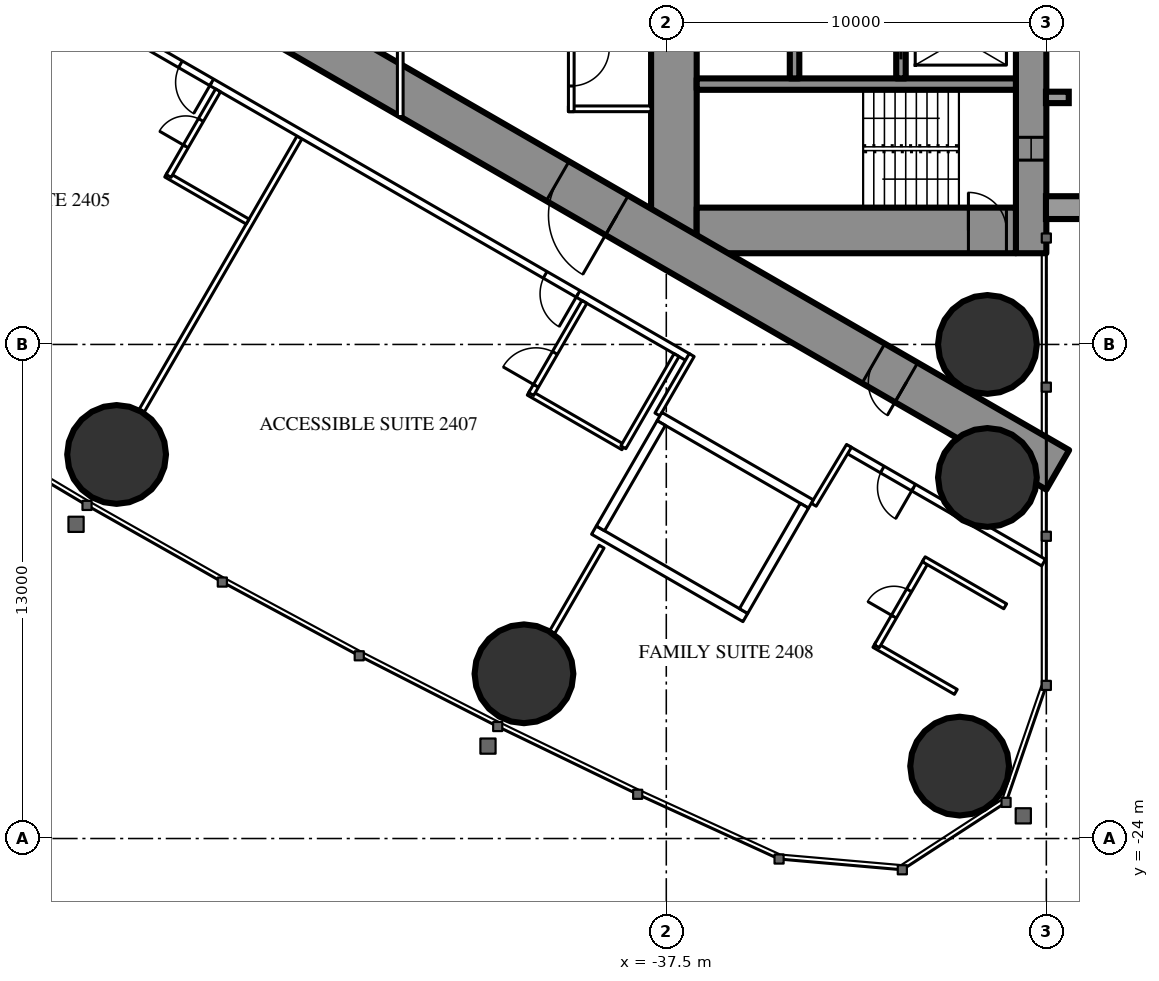
"""IFC4 building model, lengths in metres.
Left out: names, types, materials, properties, quantities, classifications, styles, units other than length and angle.
Written with IfcOpenShell. Run it as: python <this file> out.ifc"""

import sys

from ifc_helpers import new_model, si_unit, direction, frame, frame_2d, origin, origin_2d, place, context, subcontext, project, spatial, rectangle, hollow_circle, extrude, element, fill, save


model = new_model("IFC4")
c1 = context("Model", 3, precision=1e-05, world=origin(), true_north=direction((0.0, 1.0)))
c2 = subcontext(c1, "Body", "Model", "MODEL_VIEW")
j1 = project(units=[si_unit("LENGTHUNIT", "METRE"), si_unit("PLANEANGLEUNIT", "RADIAN")], contexts=[c1])
p1 = place(None, origin())
s1 = spatial("IfcSite", under=j1, at=p1, CompositionType="ELEMENT")
p2 = place(p1, origin())
s2 = spatial("IfcBuilding", under=s1, at=p2, CompositionType="ELEMENT")
p3 = place(p2, frame((0.0, 0.0, 94.1)))
s3 = spatial("IfcBuildingStorey", under=s2, at=p3, CompositionType="ELEMENT", Elevation=94.1)
for number, where, z_axis, x_axis in (
    (1, (-29.781, -22.095, 0.0), (0.0, 0.0, 1.0), (1.0, 0.0, 0.0)),
    (2, (-29.05, -11.0, 0.0), (0.0, 0.0, 1.0), (1.0, 0.0, 0.0)),
    (3, (-29.05, -14.5, 0.0), (0.0, 0.0, 1.0), (1.0, 0.0, 0.0)),
    (4, (-51.963, -13.895, 0.0), (0.0, 0.0, 1.0), (1.0, 0.0, 0.0)),
    (5, (-41.245, -19.666, 0.0), (0.0, 0.0, 1.0), (1.0, 0.0, 0.0)),
):
    element("IfcColumn", number, at=place(p3, frame(where, z_axis=z_axis, x_axis=x_axis)), inside=s3, PredefinedType="COLUMN", context=c2, shape_type="SweptSolid", body=[
        extrude(hollow_circle(Radius=1.3, WallThickness=0.1, at=origin_2d()), origin(), (0.0, 0.0, 1.0), 3.5),
    ])
p4 = place(p3, frame((-27.9, 8.6, 0.0), z_axis=(0.0, 0.0, 1.0), x_axis=(0.0, -1.0, 0.0)))
e6 = element("IfcWall", 6, at=p4, inside=s3, PredefinedType="SHEAR", context=c2, shape_type="SweptSolid", body=[
    extrude(rectangle(XDim=17.2, YDim=0.8, at=frame_2d((8.6, 0.0))), origin(), (0.0, 0.0, 1.0), 3.5),
])
p5 = place(p4, frame((2.45, 0.0, 0.6)))
e7 = element("IfcOpeningElement", 7, at=p5, cuts=e6, PredefinedType="OPENING", context=c2, shape_type="SweptSolid", body=[
    extrude(rectangle(XDim=0.6, YDim=2.1, at=frame_2d((0.3, 1.05))), frame((0.0, 0.41, 0.0), z_axis=(0.0, -1.0, 0.0), x_axis=(1.0, 0.0, 0.0)), (0.0, 0.0, 1.0), 0.82),
])
p6 = place(p4, frame((14.15, 0.0, 0.6)))
e8 = element("IfcOpeningElement", 8, at=p6, cuts=e6, PredefinedType="OPENING", context=c2, shape_type="SweptSolid", body=[
    extrude(rectangle(XDim=0.6, YDim=2.1, at=frame_2d((0.3, 1.05))), frame((0.0, 0.41, 0.0), z_axis=(0.0, -1.0, 0.0), x_axis=(1.0, 0.0, 0.0)), (0.0, 0.0, 1.0), 0.82),
])
p7 = place(p3, frame((-37.3, 8.6, 0.0), z_axis=(0.0, 0.0, 1.0), x_axis=(0.0, -1.0, 0.0)))
e9 = element("IfcWall", 9, at=p7, inside=s3, PredefinedType="SHEAR", context=c2, shape_type="SweptSolid", body=[
    extrude(rectangle(XDim=17.2, YDim=1.2, at=frame_2d((8.6, 0.0))), origin(), (0.0, 0.0, 1.0), 3.5),
])
p8 = place(p7, frame((7.7, 0.0, 0.0)))
e10 = element("IfcOpeningElement", 10, at=p8, cuts=e9, PredefinedType="OPENING", context=c2, shape_type="SweptSolid", body=[
    extrude(rectangle(XDim=1.8, YDim=2.2, at=frame_2d((0.9, 1.1))), frame((0.0, 0.61, 0.0), z_axis=(0.0, -1.0, 0.0), x_axis=(1.0, 0.0, 0.0)), (0.0, 0.0, 1.0), 1.22),
])
p9 = place(p3, frame((-28.3, -8.0, 0.0), z_axis=(0.0, 0.0, 1.0), x_axis=(-1.0, 0.0, 0.0)))
e11 = element("IfcWall", 11, at=p9, inside=s3, PredefinedType="SHEAR", context=c2, shape_type="SweptSolid", body=[
    extrude(rectangle(XDim=8.4, YDim=1.2, at=frame_2d((4.2, 0.0))), origin(), (0.0, 0.0, 1.0), 3.5),
])
p10 = place(p9, frame((0.25, 0.0, 0.0)))
e12 = element("IfcOpeningElement", 12, at=p10, cuts=e11, PredefinedType="OPENING", context=c2, shape_type="SweptSolid", body=[
    extrude(rectangle(XDim=1.0, YDim=2.2, at=frame_2d((0.5, 1.1))), frame((0.0, 0.61, 0.0), z_axis=(0.0, -1.0, 0.0), x_axis=(1.0, 0.0, 0.0)), (0.0, 0.0, 1.0), 1.22),
])
p11 = place(p3, frame((-28.3, -4.15, 0.0), z_axis=(0.0, 0.0, 1.0), x_axis=(-1.0, 0.0, 0.0)))
e13 = element("IfcWall", 13, at=p11, inside=s3, PredefinedType="SHEAR", context=c2, shape_type="SweptSolid", body=[
    extrude(rectangle(XDim=8.4, YDim=0.3, at=frame_2d((4.2, 0.0))), origin(), (0.0, 0.0, 1.0), 3.5),
])
p12 = place(p3, frame((-31.325, -1.9, 0.0), z_axis=(0.0, 0.0, 1.0), x_axis=(0.0, -1.0, 0.0)))
e14 = element("IfcWall", 14, at=p12, inside=s3, PredefinedType="SHEAR", context=c2, shape_type="SweptSolid", body=[
    extrude(rectangle(XDim=2.1, YDim=0.25, at=frame_2d((1.05, 0.0))), origin(), (0.0, 0.0, 1.0), 3.5),
])
p13 = place(p12, frame((0.5, 0.0, 0.0)))
e15 = element("IfcOpeningElement", 15, at=p13, cuts=e14, PredefinedType="OPENING", context=c2, shape_type="SweptSolid", body=[
    extrude(rectangle(XDim=1.1, YDim=2.2, at=frame_2d((0.55, 1.1))), frame((0.0, 0.135, 0.0), z_axis=(0.0, -1.0, 0.0), x_axis=(1.0, 0.0, 0.0)), (0.0, 0.0, 1.0), 0.27),
])
p14 = place(p3, frame((-34.125, -1.65, 0.0), z_axis=(0.0, 0.0, 1.0), x_axis=(0.0, -1.0, 0.0)))
e16 = element("IfcWall", 16, at=p14, inside=s3, PredefinedType="SHEAR", context=c2, shape_type="SweptSolid", body=[
    extrude(rectangle(XDim=2.35, YDim=0.25, at=frame_2d((1.175, 0.0))), origin(), (0.0, 0.0, 1.0), 3.5),
])
p15 = place(p3, frame((-27.2, -14.3, 0.0), z_axis=(0.0, 0.0, 1.0), x_axis=(-0.866024021859, 0.500002393557, 0.0)))
e17 = element("IfcWall", 17, at=p15, inside=s3, PredefinedType="SHEAR", context=c2, shape_type="SweptSolid", body=[
    extrude(rectangle(XDim=27.907, YDim=1.2, at=frame_2d((13.954, 0.0))), origin(), (0.0, 0.0, 1.0), 3.5),
])
p16 = place(p15, frame((4.6, 0.0, 0.0)))
e18 = element("IfcOpeningElement", 18, at=p16, cuts=e17, PredefinedType="OPENING", context=c2, shape_type="SweptSolid", body=[
    extrude(rectangle(XDim=1.0, YDim=2.2, at=frame_2d((0.5, 1.1))), frame((0.0, 0.61, 0.0), z_axis=(0.0, -1.0, 0.0), x_axis=(1.0, 0.0, 0.0)), (0.0, 0.0, 1.0), 1.22),
])
p17 = place(p15, frame((13.395, 0.0, 0.0)))
e19 = element("IfcOpeningElement", 19, at=p17, cuts=e17, PredefinedType="OPENING", context=c2, shape_type="SweptSolid", body=[
    extrude(rectangle(XDim=1.8, YDim=2.2, at=frame_2d((0.9, 1.1))), frame((0.0, 0.61, 0.0), z_axis=(0.0, -1.0, 0.0), x_axis=(1.0, 0.0, 0.0)), (0.0, 0.0, 1.0), 1.22),
])
p18 = place(p3, frame((-47.151, -5.552, 0.0), z_axis=(0.0, 0.0, 1.0), x_axis=(-0.500003012045, -0.866023664773, 0.0)))
e20 = element("IfcWall", 20, at=p18, inside=s3, PredefinedType="PARTITIONING", context=c2, shape_type="SweptSolid", body=[
    extrude(rectangle(XDim=8.311, YDim=0.15, at=frame_2d((4.156, 0.0))), origin(), (0.0, 0.0, 1.0), 2.2),
])
p19 = place(p3, frame((-39.202, -16.32, 0.0), z_axis=(0.0, 0.0, 1.0), x_axis=(-0.49997716683, -0.86603858612, 0.0)))
e21 = element("IfcWall", 21, at=p19, inside=s3, PredefinedType="PARTITIONING", context=c2, shape_type="SweptSolid", body=[
    extrude(rectangle(XDim=2.6, YDim=0.15, at=frame_2d((1.3, 0.0))), origin(), (0.0, 0.0, 1.0), 3.25),
])
p20 = place(p3, frame((-27.572, -16.741, 0.0), z_axis=(0.0, 0.0, 1.0), x_axis=(-0.866024464444, 0.500001626982, 0.0)))
e22 = element("IfcWall", 22, at=p20, inside=s3, PredefinedType="PARTITIONING", context=c2, shape_type="SweptSolid", body=[
    extrude(rectangle(XDim=5.955, YDim=0.2, at=frame_2d((2.978, 0.0))), origin(), (0.0, 0.0, 1.0), 3.25),
])
p21 = place(p20, frame((3.95, 0.0, 0.0)))
e23 = element("IfcOpeningElement", 23, at=p21, cuts=e22, PredefinedType="OPENING", context=c2, shape_type="SweptSolid", body=[
    extrude(rectangle(XDim=0.95, YDim=2.2, at=frame_2d((0.475, 1.1))), frame((0.0, 0.11, 0.0), z_axis=(0.0, -1.0, 0.0), x_axis=(1.0, 0.0, 0.0)), (0.0, 0.0, 1.0), 0.22),
])
p22 = place(p3, frame((-36.92, -11.344, 0.0), z_axis=(0.0, 0.0, 1.0), x_axis=(-0.866028313256, 0.499994960614, 0.0)))
e24 = element("IfcWall", 24, at=p22, inside=s3, PredefinedType="PARTITIONING", context=c2, shape_type="SweptSolid", body=[
    extrude(rectangle(XDim=22.568, YDim=0.2, at=frame_2d((11.284, 0.0))), origin(), (0.0, 0.0, 1.0), 3.25),
])
p23 = place(p22, frame((14.481, 0.0, 0.0)))
e25 = element("IfcOpeningElement", 25, at=p23, cuts=e24, PredefinedType="OPENING", context=c2, shape_type="SweptSolid", body=[
    extrude(rectangle(XDim=0.95, YDim=2.2, at=frame_2d((0.475, 1.1))), frame((0.0, 0.11, 0.0), z_axis=(0.0, -1.0, 0.0), x_axis=(1.0, 0.0, 0.0)), (0.0, 0.0, 1.0), 0.22),
])
p24 = place(p22, frame((3.35, 0.0, 0.0)))
e26 = element("IfcOpeningElement", 26, at=p24, cuts=e24, PredefinedType="OPENING", context=c2, shape_type="SweptSolid", body=[
    extrude(rectangle(XDim=1.0, YDim=2.2, at=frame_2d((0.5, 1.1))), frame((0.0, 0.11, 0.0), z_axis=(0.0, -1.0, 0.0), x_axis=(1.0, 0.0, 0.0)), (0.0, 0.0, 1.0), 0.22),
])
p25 = place(p3, frame((-36.831, -11.28, 0.0), z_axis=(0.0, 0.0, 1.0), x_axis=(-0.499937177781, -0.866061671171, 0.0)))
e27 = element("IfcWall", 27, at=p25, inside=s3, PredefinedType="PARTITIONING", context=c2, shape_type="SweptSolid", body=[
    extrude(rectangle(XDim=1.804, YDim=0.15, at=frame_2d((0.902, 0.0))), origin(), (0.0, 0.0, 1.0), 3.25),
])
p26 = place(p3, frame((-33.621, -15.218, 0.0), z_axis=(0.0, 0.0, 1.0), x_axis=(0.514336634837, 0.857588377991, 0.0)))
e28 = element("IfcWall", 28, at=p26, inside=s3, PredefinedType="PARTITIONING", context=c2, shape_type="SweptSolid", body=[
    extrude(rectangle(XDim=1.805, YDim=0.15, at=frame_2d((0.903, 0.0))), origin(), (0.0, 0.0, 1.0), 3.25),
])
p27 = place(p3, frame((-48.516, -7.767, 0.0), z_axis=(0.0, 0.0, 1.0), x_axis=(-0.866031185235, 0.4999899861, 0.0)))
e29 = element("IfcWall", 29, at=p27, inside=s3, PredefinedType="PARTITIONING", context=c2, shape_type="SweptSolid", body=[
    extrude(rectangle(XDim=2.475, YDim=0.15, at=frame_2d((1.238, 0.0))), origin(), (0.0, 0.0, 1.0), 3.25),
])
p28 = place(p3, frame((-49.295, -4.315, 0.0), z_axis=(0.0, 0.0, 1.0), x_axis=(-0.499936506574, -0.866062058628, 0.0)))
e30 = element("IfcWall", 30, at=p28, inside=s3, PredefinedType="PARTITIONING", context=c2, shape_type="SweptSolid", body=[
    extrude(rectangle(XDim=2.6, YDim=0.15, at=frame_2d((1.3, 0.0))), origin(), (0.0, 0.0, 1.0), 3.25),
])
p29 = place(p28, frame((0.9, 0.0, 0.0)))
e31 = element("IfcOpeningElement", 31, at=p29, cuts=e30, PredefinedType="OPENING", context=c2, shape_type="SweptSolid", body=[
    extrude(rectangle(XDim=0.8, YDim=2.2, at=frame_2d((0.4, 1.1))), frame((0.0, 0.085, 0.0), z_axis=(0.0, -1.0, 0.0), x_axis=(1.0, 0.0, 0.0)), (0.0, 0.0, 1.0), 0.17),
])
p30 = place(p3, frame((-38.63, -13.705, 0.0), z_axis=(0.0, 0.0, 1.0), x_axis=(-0.866018712932, 0.500011588718, 0.0)))
e32 = element("IfcWall", 32, at=p30, inside=s3, PredefinedType="PARTITIONING", context=c2, shape_type="SweptSolid", body=[
    extrude(rectangle(XDim=2.875, YDim=0.15, at=frame_2d((1.438, 0.0))), origin(), (0.0, 0.0, 1.0), 3.25),
])
p31 = place(p3, frame((-39.655, -9.88, 0.0), z_axis=(0.0, 0.0, 1.0), x_axis=(-0.500049511043, -0.865996816683, 0.0)))
e33 = element("IfcWall", 33, at=p31, inside=s3, PredefinedType="PARTITIONING", context=c2, shape_type="SweptSolid", body=[
    extrude(rectangle(XDim=2.8, YDim=0.15, at=frame_2d((1.4, 0.0))), origin(), (0.0, 0.0, 1.0), 3.25),
])
p32 = place(p31, frame((1.55, 0.0, 0.0)))
e34 = element("IfcOpeningElement", 34, at=p32, cuts=e33, PredefinedType="OPENING", context=c2, shape_type="SweptSolid", body=[
    extrude(rectangle(XDim=1.0, YDim=2.2, at=frame_2d((0.5, 1.1))), frame((0.0, 0.085, 0.0), z_axis=(0.0, -1.0, 0.0), x_axis=(1.0, 0.0, 0.0)), (0.0, 0.0, 1.0), 0.17),
])
p33 = place(p3, frame((-37.23, -11.281, 0.0), z_axis=(0.0, 0.0, 1.0), x_axis=(-0.500049511043, -0.865996816683, 0.0)))
e35 = element("IfcWall", 35, at=p33, inside=s3, PredefinedType="PARTITIONING", context=c2, shape_type="SweptSolid", body=[
    extrude(rectangle(XDim=2.8, YDim=0.15, at=frame_2d((1.4, 0.0))), origin(), (0.0, 0.0, 1.0), 3.25),
])
p34 = place(p3, frame((-29.882, -20.142, 0.0), z_axis=(0.0, 0.0, 1.0), x_axis=(-0.866031185235, 0.4999899861, 0.0)))
e36 = element("IfcWall", 36, at=p34, inside=s3, PredefinedType="PARTITIONING", context=c2, shape_type="SweptSolid", body=[
    extrude(rectangle(XDim=2.475, YDim=0.15, at=frame_2d((1.238, 0.0))), origin(), (0.0, 0.0, 1.0), 3.25),
])
p35 = place(p3, frame((-30.66, -16.69, 0.0), z_axis=(0.0, 0.0, 1.0), x_axis=(-0.499936506574, -0.866062058628, 0.0)))
e37 = element("IfcWall", 37, at=p35, inside=s3, PredefinedType="PARTITIONING", context=c2, shape_type="SweptSolid", body=[
    extrude(rectangle(XDim=2.6, YDim=0.15, at=frame_2d((1.3, 0.0))), origin(), (0.0, 0.0, 1.0), 3.25),
])
p36 = place(p35, frame((0.9, 0.0, 0.0)))
e38 = element("IfcOpeningElement", 38, at=p36, cuts=e37, PredefinedType="OPENING", context=c2, shape_type="SweptSolid", body=[
    extrude(rectangle(XDim=0.8, YDim=2.2, at=frame_2d((0.4, 1.1))), frame((0.0, 0.085, 0.0), z_axis=(0.0, -1.0, 0.0), x_axis=(1.0, 0.0, 0.0)), (0.0, 0.0, 1.0), 0.17),
])
p37 = place(p3, frame((-28.582, -17.89, 0.0), z_axis=(0.0, 0.0, 1.0), x_axis=(-0.866073894602, 0.499916002032, 0.0)))
e39 = element("IfcWall", 39, at=p37, inside=s3, PredefinedType="PARTITIONING", context=c2, shape_type="SweptSolid", body=[
    extrude(rectangle(XDim=2.475, YDim=0.15, at=frame_2d((1.238, 0.0))), origin(), (0.0, 0.0, 1.0), 3.25),
])
p38 = place(p3, frame((-37.9, -4.8, 0.0), z_axis=(0.0, 0.0, 1.0), x_axis=(-1.0, 0.0, 0.0)))
e40 = element("IfcWall", 40, at=p38, inside=s3, PredefinedType="PARTITIONING", context=c2, shape_type="SweptSolid", body=[
    extrude(rectangle(XDim=2.175, YDim=0.15, at=frame_2d((1.087, 0.0))), origin(), (0.0, 0.0, 1.0), 3.25),
])
p39 = place(p3, frame((-40.0, -2.525, 0.0), z_axis=(0.0, 0.0, 1.0), x_axis=(0.0, -1.0, 0.0)))
e41 = element("IfcWall", 41, at=p39, inside=s3, PredefinedType="PARTITIONING", context=c2, shape_type="SweptSolid", body=[
    extrude(rectangle(XDim=2.35, YDim=0.15, at=frame_2d((1.175, 0.0))), origin(), (0.0, 0.0, 1.0), 3.25),
])
p40 = place(p39, frame((0.675, 0.0, 0.0)))
e42 = element("IfcOpeningElement", 42, at=p40, cuts=e41, PredefinedType="OPENING", context=c2, shape_type="SweptSolid", body=[
    extrude(rectangle(XDim=1.0, YDim=2.2, at=frame_2d((0.5, 1.1))), frame((0.0, 0.085, 0.0), z_axis=(0.0, -1.0, 0.0), x_axis=(1.0, 0.0, 0.0)), (0.0, 0.0, 1.0), 0.17),
])
p41 = place(p3, frame((-44.5, 5.005, 0.0), z_axis=(0.0, 0.0, 1.0), x_axis=(0.0, -1.0, 0.0)))
e43 = element("IfcWall", 43, at=p41, inside=s3, PredefinedType="PARTITIONING", context=c2, shape_type="SweptSolid", body=[
    extrude(rectangle(XDim=10.009, YDim=0.15, at=frame_2d((5.005, 0.0))), origin(), (0.0, 0.0, 1.0), 2.45),
])
p42 = place(p41, frame((2.002, 0.0, 0.0)))
e44 = element("IfcOpeningElement", 44, at=p42, cuts=e43, PredefinedType="OPENING", context=c2, shape_type="SweptSolid", body=[
    extrude(rectangle(XDim=1.0, YDim=2.2, at=frame_2d((0.5, 1.1))), frame((0.0, 0.085, 0.0), z_axis=(0.0, -1.0, 0.0), x_axis=(1.0, 0.0, 0.0)), (0.0, 0.0, 1.0), 0.17),
])
p43 = place(p41, frame((7.007, 0.0, 0.0)))
e45 = element("IfcOpeningElement", 45, at=p43, cuts=e43, PredefinedType="OPENING", context=c2, shape_type="SweptSolid", body=[
    extrude(rectangle(XDim=1.0, YDim=2.2, at=frame_2d((0.5, 1.1))), frame((0.0, 0.085, 0.0), z_axis=(0.0, -1.0, 0.0), x_axis=(1.0, 0.0, 0.0)), (0.0, 0.0, 1.0), 0.17),
])
p44 = place(p3, frame((-33.696, -15.197, 0.0), z_axis=(0.0, 0.0, 1.0), x_axis=(-0.865976953817, 0.500083908417, 0.0)))
e46 = element("IfcWall", 46, at=p44, inside=s3, PredefinedType="PARTITIONING", context=c2, shape_type="SweptSolid", body=[
    extrude(rectangle(XDim=4.599, YDim=0.25, at=frame_2d((2.3, 0.0))), origin(), (0.0, 0.0, 1.0), 3.25),
])
p45 = place(p3, frame((-35.42, -18.186, 0.0), z_axis=(0.0, 0.0, 1.0), x_axis=(-0.865990227814, 0.50006092162, 0.0)))
e47 = element("IfcWall", 47, at=p45, inside=s3, PredefinedType="PARTITIONING", context=c2, shape_type="SweptSolid", body=[
    extrude(rectangle(XDim=4.6, YDim=0.25, at=frame_2d((2.3, 0.0))), origin(), (0.0, 0.0, 1.0), 3.25),
])
p46 = place(p3, frame((-33.866, -15.243, 0.0), z_axis=(0.0, 0.0, 1.0), x_axis=(-0.499929347863, -0.866066190972, 0.0)))
e48 = element("IfcWall", 48, at=p46, inside=s3, PredefinedType="PARTITIONING", context=c2, shape_type="SweptSolid", body=[
    extrude(rectangle(XDim=3.201, YDim=0.25, at=frame_2d((1.6, 0.0))), origin(), (0.0, 0.0, 1.0), 3.25),
])
p47 = place(p3, frame((-37.633, -13.068, 0.0), z_axis=(0.0, 0.0, 1.0), x_axis=(-0.499872130319, -0.866099216793, 0.0)))
e49 = element("IfcWall", 49, at=p47, inside=s3, PredefinedType="PARTITIONING", context=c2, shape_type="SweptSolid", body=[
    extrude(rectangle(XDim=3.2, YDim=0.25, at=frame_2d((1.6, 0.0))), origin(), (0.0, 0.0, 1.0), 3.25),
])
p48 = place(p29, origin())
e50 = element("IfcDoor", 50, at=p48, inside=s3, OperationType="SINGLE_SWING_RIGHT", PredefinedType="DOOR", context=c2, shape_type="SweptSolid", body=[
    extrude(rectangle(XDim=0.8, YDim=2.2, at=frame_2d((0.4, 1.1))), frame((0.0, 0.025, 0.0), z_axis=(0.0, -1.0, 0.0), x_axis=(1.0, 0.0, 0.0)), (0.0, 0.0, 1.0), 0.05),
])
fill(e31, e50)
p49 = place(p23, origin())
e51 = element("IfcDoor", 51, at=p49, inside=s3, OperationType="SINGLE_SWING_LEFT", PredefinedType="DOOR", context=c2, shape_type="SweptSolid", body=[
    extrude(rectangle(XDim=0.95, YDim=2.2, at=frame_2d((0.475, 1.1))), frame((0.0, 0.025, 0.0), z_axis=(0.0, -1.0, 0.0), x_axis=(1.0, 0.0, 0.0)), (0.0, 0.0, 1.0), 0.05),
])
fill(e25, e51)
p50 = place(p32, origin())
e52 = element("IfcDoor", 52, at=p50, inside=s3, OperationType="SINGLE_SWING_RIGHT", PredefinedType="DOOR", context=c2, shape_type="SweptSolid", body=[
    extrude(rectangle(XDim=1.0, YDim=2.2, at=frame_2d((0.5, 1.1))), frame((0.0, 0.025, 0.0), z_axis=(0.0, -1.0, 0.0), x_axis=(1.0, 0.0, 0.0)), (0.0, 0.0, 1.0), 0.05),
])
fill(e34, e52)
p51 = place(p24, origin())
e53 = element("IfcDoor", 53, at=p51, inside=s3, OperationType="SINGLE_SWING_LEFT", PredefinedType="DOOR", context=c2, shape_type="SweptSolid", body=[
    extrude(rectangle(XDim=1.0, YDim=2.2, at=frame_2d((0.5, 1.1))), frame((0.0, 0.025, 0.0), z_axis=(0.0, -1.0, 0.0), x_axis=(1.0, 0.0, 0.0)), (0.0, 0.0, 1.0), 0.05),
])
fill(e26, e53)
p52 = place(p36, origin())
e54 = element("IfcDoor", 54, at=p52, inside=s3, OperationType="SINGLE_SWING_RIGHT", PredefinedType="DOOR", context=c2, shape_type="SweptSolid", body=[
    extrude(rectangle(XDim=0.8, YDim=2.2, at=frame_2d((0.4, 1.1))), frame((0.0, 0.025, 0.0), z_axis=(0.0, -1.0, 0.0), x_axis=(1.0, 0.0, 0.0)), (0.0, 0.0, 1.0), 0.05),
])
fill(e38, e54)
p53 = place(p21, origin())
e55 = element("IfcDoor", 55, at=p53, inside=s3, OperationType="SINGLE_SWING_LEFT", PredefinedType="DOOR", context=c2, shape_type="SweptSolid", body=[
    extrude(rectangle(XDim=0.95, YDim=2.2, at=frame_2d((0.475, 1.1))), frame((0.0, 0.025, 0.0), z_axis=(0.0, -1.0, 0.0), x_axis=(1.0, 0.0, 0.0)), (0.0, 0.0, 1.0), 0.05),
])
fill(e23, e55)
p54 = place(p40, origin())
e56 = element("IfcDoor", 56, at=p54, inside=s3, OperationType="SINGLE_SWING_LEFT", PredefinedType="DOOR", context=c2, shape_type="SweptSolid", body=[
    extrude(rectangle(XDim=1.0, YDim=2.2, at=frame_2d((0.5, 1.1))), frame((0.0, 0.025, 0.0), z_axis=(0.0, -1.0, 0.0), x_axis=(1.0, 0.0, 0.0)), (0.0, 0.0, 1.0), 0.05),
])
fill(e42, e56)
p55 = place(p16, origin())
e57 = element("IfcDoor", 57, at=p55, inside=s3, OperationType="SINGLE_SWING_LEFT", PredefinedType="DOOR", context=c2, shape_type="SweptSolid", body=[
    extrude(rectangle(XDim=1.0, YDim=2.2, at=frame_2d((0.5, 1.1))), frame((0.0, 0.025, 0.0), z_axis=(0.0, -1.0, 0.0), x_axis=(1.0, 0.0, 0.0)), (0.0, 0.0, 1.0), 0.05),
])
fill(e18, e57)
p56 = place(p17, origin())
e58 = element("IfcDoor", 58, at=p56, inside=s3, OperationType="DOUBLE_DOOR_SINGLE_SWING", PredefinedType="DOOR", context=c2, shape_type="SweptSolid", body=[
    extrude(rectangle(XDim=1.8, YDim=2.2, at=frame_2d((0.9, 1.1))), frame((0.0, 0.025, 0.0), z_axis=(0.0, -1.0, 0.0), x_axis=(1.0, 0.0, 0.0)), (0.0, 0.0, 1.0), 0.05),
])
fill(e19, e58)
p57 = place(p10, origin())
e59 = element("IfcDoor", 59, at=p57, inside=s3, OperationType="SINGLE_SWING_RIGHT", PredefinedType="DOOR", context=c2, shape_type="SweptSolid", body=[
    extrude(rectangle(XDim=1.0, YDim=2.2, at=frame_2d((0.5, 1.1))), frame((0.0, 0.025, 0.0), z_axis=(0.0, -1.0, 0.0), x_axis=(1.0, 0.0, 0.0)), (0.0, 0.0, 1.0), 0.05),
])
fill(e12, e59)
p58 = place(p13, origin())
e60 = element("IfcDoor", 60, at=p58, inside=s3, OperationType="SLIDING_TO_LEFT", PredefinedType="USERDEFINED", context=c2, shape_type="SweptSolid", body=[
    extrude(rectangle(XDim=1.1, YDim=2.2, at=frame_2d((0.55, 1.1))), frame((0.0, 0.025, 0.0), z_axis=(0.0, -1.0, 0.0), x_axis=(1.0, 0.0, 0.0)), (0.0, 0.0, 1.0), 0.05),
])
fill(e15, e60)
p59 = place(p6, origin())
e61 = element("IfcWindow", 61, at=p59, inside=s3, PartitioningType="SINGLE_PANEL", PredefinedType="WINDOW", context=c2, shape_type="SweptSolid", body=[
    extrude(rectangle(XDim=0.6, YDim=2.1, at=frame_2d((0.3, 1.05))), frame((0.0, 0.03, 0.0), z_axis=(0.0, -1.0, 0.0), x_axis=(1.0, 0.0, 0.0)), (0.0, 0.0, 1.0), 0.06),
])
fill(e8, e61)
save(model, sys.argv[1])
